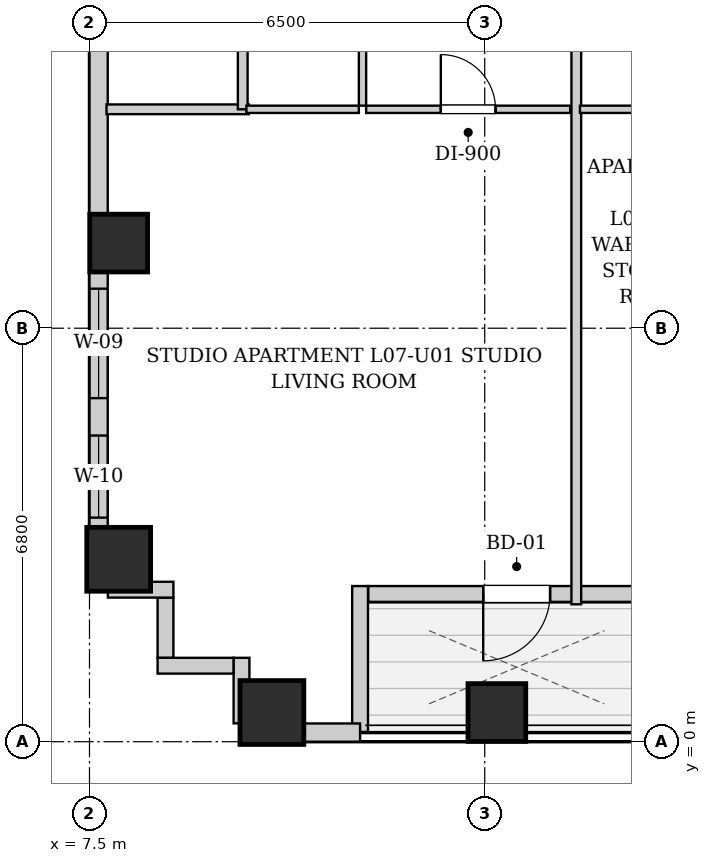
"""IFC4 building model, lengths in metres.
Left out: names, types, materials, properties, quantities, classifications, styles, units other than length and angle.
Written with IfcOpenShell. Run it as: python <this file> out.ifc"""

import sys

from ifc_helpers import new_model, si_unit, direction, frame, frame_2d, origin, origin_2d, place, context, subcontext, project, spatial, rectangle, extrude, element, fill, save


model = new_model("IFC4")
c1 = context("Model", 3, precision=1e-05, world=origin(), true_north=direction((0.0, 1.0)))
c2 = subcontext(c1, "Body", "Model", "MODEL_VIEW")
j1 = project(units=[si_unit("LENGTHUNIT", "METRE"), si_unit("PLANEANGLEUNIT", "RADIAN")], contexts=[c1])
p1 = place(None, origin())
s1 = spatial("IfcSite", under=j1, at=p1, CompositionType="ELEMENT")
p2 = place(p1, origin())
s2 = spatial("IfcBuilding", under=s1, at=p2, CompositionType="ELEMENT")
p3 = place(p2, frame((0.0, 0.0, 32.2)))
s3 = spatial("IfcBuildingStorey", under=s2, at=p3, CompositionType="ELEMENT", Elevation=32.2)
p4 = place(p3, frame((10.5, 0.48, 0.0), z_axis=(0.0, 0.0, 1.0), x_axis=(1.0, 0.0, 0.0)))
e1 = element("IfcColumn", 1, at=p4, inside=s3, PredefinedType="COLUMN", context=c2, shape_type="SweptSolid", body=[
    extrude(rectangle(XDim=1.05, YDim=1.05, at=origin_2d()), origin(), (0.0, 0.0, 1.0), 3.2),
])
p5 = place(p3, frame((14.2, 0.48, 0.0), z_axis=(0.0, 0.0, 1.0), x_axis=(1.0, 0.0, 0.0)))
e2 = element("IfcColumn", 2, at=p5, inside=s3, PredefinedType="COLUMN", context=c2, shape_type="SweptSolid", body=[
    extrude(rectangle(XDim=0.95, YDim=0.95, at=origin_2d()), origin(), (0.0, 0.0, 1.0), 3.2),
])
p6 = place(p3, frame((7.98, 3.0, 0.0), z_axis=(0.0, 0.0, 1.0), x_axis=(1.0, 0.0, 0.0)))
e3 = element("IfcColumn", 3, at=p6, inside=s3, PredefinedType="COLUMN", context=c2, shape_type="SweptSolid", body=[
    extrude(rectangle(XDim=1.05, YDim=1.05, at=origin_2d()), origin(), (0.0, 0.0, 1.0), 3.2),
])
p7 = place(p3, frame((7.98, 8.2, 0.0), z_axis=(0.0, 0.0, 1.0), x_axis=(1.0, 0.0, 0.0)))
e4 = element("IfcColumn", 4, at=p7, inside=s3, PredefinedType="COLUMN", context=c2, shape_type="SweptSolid", body=[
    extrude(rectangle(XDim=0.95, YDim=0.95, at=origin_2d()), origin(), (0.0, 0.0, 1.0), 3.2),
])
p8 = place(p3, frame((16.966, 2.43, 0.0), z_axis=(0.0, 0.0, 1.0), x_axis=(-1.0, 0.0, 0.0)))
e5 = element("IfcWall", 5, at=p8, inside=s3, PredefinedType="SOLIDWALL", context=c2, shape_type="SweptSolid", body=[
    extrude(rectangle(XDim=4.882, YDim=0.26, at=frame_2d((2.441, 0.0))), origin(), (0.0, 0.0, 1.0), 2.94),
])
p9 = place(p8, frame((1.891, 0.0, 0.0)))
e6 = element("IfcOpeningElement", 6, at=p9, cuts=e5, PredefinedType="OPENING", context=c2, shape_type="SweptSolid", body=[
    extrude(rectangle(XDim=1.1, YDim=2.0, at=frame_2d((0.55, 1.0))), frame((0.0, 0.14, 0.0), z_axis=(0.0, -1.0, 0.0), x_axis=(1.0, 0.0, 0.0)), (0.0, 0.0, 1.0), 0.28),
])
p10 = place(p3, frame((11.95, 2.56, 0.0), z_axis=(0.0, 0.0, 1.0), x_axis=(0.0, -1.0, 0.0)))
e7 = element("IfcWall", 7, at=p10, inside=s3, PredefinedType="SOLIDWALL", context=c2, shape_type="SweptSolid", body=[
    extrude(rectangle(XDim=2.4, YDim=0.26, at=frame_2d((1.2, 0.0))), origin(), (0.0, 0.0, 1.0), 2.94),
])
p11 = place(p3, frame((11.95, 0.15, 0.0), z_axis=(0.0, 0.0, 1.0), x_axis=(-1.0, 0.0, 0.0)))
e8 = element("IfcWall", 8, at=p11, inside=s3, PredefinedType="SOLIDWALL", context=c2, shape_type="SweptSolid", body=[
    extrude(rectangle(XDim=1.95, YDim=0.3, at=frame_2d((0.975, 0.0))), origin(), (0.0, 0.0, 1.0), 1.975),
])
p12 = place(p3, frame((7.65, 2.5, 0.0), z_axis=(0.0, 0.0, 1.0), x_axis=(0.0, 1.0, 0.0)))
e9 = element("IfcWall", 9, at=p12, inside=s3, PredefinedType="SOLIDWALL", context=c2, shape_type="SweptSolid", body=[
    extrude(rectangle(XDim=42.6, YDim=0.3, at=frame_2d((21.3, 0.0))), origin(), (0.0, 0.0, 1.0), 1.975),
])
p13 = place(p12, frame((3.15, 0.0, 0.55)))
e10 = element("IfcOpeningElement", 10, at=p13, cuts=e9, PredefinedType="OPENING", context=c2, shape_type="SweptSolid", body=[
    extrude(rectangle(XDim=1.8, YDim=1.2, at=frame_2d((0.9, 0.6))), frame((0.0, 0.16, 0.0), z_axis=(0.0, -1.0, 0.0), x_axis=(1.0, 0.0, 0.0)), (0.0, 0.0, 1.0), 0.32),
])
p14 = place(p12, frame((1.185, 0.0, 0.55)))
e11 = element("IfcOpeningElement", 11, at=p14, cuts=e9, PredefinedType="OPENING", context=c2, shape_type="SweptSolid", body=[
    extrude(rectangle(XDim=1.35, YDim=1.2, at=frame_2d((0.675, 0.6))), frame((0.0, 0.16, 0.0), z_axis=(0.0, -1.0, 0.0), x_axis=(1.0, 0.0, 0.0)), (0.0, 0.0, 1.0), 0.32),
])
p15 = place(p12, frame((37.135, 0.0, 0.55)))
e12 = element("IfcOpeningElement", 12, at=p15, cuts=e9, PredefinedType="OPENING", context=c2, shape_type="SweptSolid", body=[
    extrude(rectangle(XDim=1.8, YDim=1.2, at=frame_2d((0.9, 0.6))), frame((0.0, 0.16, 0.0), z_axis=(0.0, -1.0, 0.0), x_axis=(1.0, 0.0, 0.0)), (0.0, 0.0, 1.0), 0.32),
])
p16 = place(p12, frame((31.55, 0.0, 0.55)))
e13 = element("IfcOpeningElement", 13, at=p16, cuts=e9, PredefinedType="OPENING", context=c2, shape_type="SweptSolid", body=[
    extrude(rectangle(XDim=1.35, YDim=1.2, at=frame_2d((0.675, 0.6))), frame((0.0, 0.16, 0.0), z_axis=(0.0, -1.0, 0.0), x_axis=(1.0, 0.0, 0.0)), (0.0, 0.0, 1.0), 0.32),
])
p17 = place(p12, frame((15.2, 0.0, 0.55)))
e14 = element("IfcOpeningElement", 14, at=p17, cuts=e9, PredefinedType="OPENING", context=c2, shape_type="SweptSolid", body=[
    extrude(rectangle(XDim=1.8, YDim=1.2, at=frame_2d((0.9, 0.6))), frame((0.0, 0.16, 0.0), z_axis=(0.0, -1.0, 0.0), x_axis=(1.0, 0.0, 0.0)), (0.0, 0.0, 1.0), 0.32),
])
p18 = place(p12, frame((13.135, 0.0, 0.55)))
e15 = element("IfcOpeningElement", 15, at=p18, cuts=e9, PredefinedType="OPENING", context=c2, shape_type="SweptSolid", body=[
    extrude(rectangle(XDim=1.35, YDim=1.2, at=frame_2d((0.675, 0.6))), frame((0.0, 0.16, 0.0), z_axis=(0.0, -1.0, 0.0), x_axis=(1.0, 0.0, 0.0)), (0.0, 0.0, 1.0), 0.32),
])
p19 = place(p12, frame((22.575, 0.0, 0.55)))
e16 = element("IfcOpeningElement", 16, at=p19, cuts=e9, PredefinedType="OPENING", context=c2, shape_type="SweptSolid", body=[
    extrude(rectangle(XDim=1.8, YDim=1.2, at=frame_2d((0.9, 0.6))), frame((0.0, 0.16, 0.0), z_axis=(0.0, -1.0, 0.0), x_axis=(1.0, 0.0, 0.0)), (0.0, 0.0, 1.0), 0.32),
])
p20 = place(p3, frame((10.0, 0.302, 0.0), z_axis=(0.0, 0.0, 1.0), x_axis=(0.0, 1.0, 0.0)))
e17 = element("IfcWall", 17, at=p20, inside=s3, PredefinedType="SOLIDWALL", context=c2, shape_type="SweptSolid", body=[
    extrude(rectangle(XDim=1.078, YDim=0.26, at=frame_2d((0.539, 0.0))), origin(), (0.0, 0.0, 1.0), 2.94),
])
p21 = place(p3, frame((9.868, 1.25, 0.0), z_axis=(0.0, 0.0, 1.0), x_axis=(-1.0, 0.0, 0.0)))
e18 = element("IfcWall", 18, at=p21, inside=s3, PredefinedType="SOLIDWALL", context=c2, shape_type="SweptSolid", body=[
    extrude(rectangle(XDim=1.248, YDim=0.26, at=frame_2d((0.624, 0.0))), origin(), (0.0, 0.0, 1.0), 2.94),
])
p22 = place(p3, frame((8.75, 1.382, 0.0), z_axis=(0.0, 0.0, 1.0), x_axis=(0.0, 1.0, 0.0)))
e19 = element("IfcWall", 19, at=p22, inside=s3, PredefinedType="SOLIDWALL", context=c2, shape_type="SweptSolid", body=[
    extrude(rectangle(XDim=0.986, YDim=0.26, at=frame_2d((0.493, 0.0))), origin(), (0.0, 0.0, 1.0), 2.94),
])
p23 = place(p3, frame((8.88, 2.5, 0.0), z_axis=(0.0, 0.0, 1.0), x_axis=(-1.0, 0.0, 0.0)))
e20 = element("IfcWall", 20, at=p23, inside=s3, PredefinedType="SOLIDWALL", context=c2, shape_type="SweptSolid", body=[
    extrude(rectangle(XDim=1.078, YDim=0.26, at=frame_2d((0.539, 0.0))), origin(), (0.0, 0.0, 1.0), 2.94),
])
p24 = place(p3, frame((7.78, 10.4, 0.0), z_axis=(0.0, 0.0, 1.0), x_axis=(1.0, 0.0, 0.0)))
e21 = element("IfcWall", 21, at=p24, inside=s3, PredefinedType="PARTITIONING", context=c2, shape_type="SweptSolid", body=[
    extrude(rectangle(XDim=2.34, YDim=0.16, at=frame_2d((1.17, 0.0))), origin(), (0.0, 0.0, 1.0), 2.94),
])
p25 = place(p3, frame((10.02, 10.4, 0.0), z_axis=(0.0, 0.0, 1.0), x_axis=(0.0, 1.0, 0.0)))
e22 = element("IfcWall", 22, at=p25, inside=s3, PredefinedType="PARTITIONING", context=c2, shape_type="SweptSolid", body=[
    extrude(rectangle(XDim=2.91, YDim=0.16, at=frame_2d((1.455, 0.0))), origin(), (0.0, 0.0, 1.0), 2.94),
])
p26 = place(p3, frame((11.99, 10.46, 0.0), z_axis=(0.0, 0.0, 1.0), x_axis=(0.0, 1.0, 0.0)))
e23 = element("IfcWall", 23, at=p26, inside=s3, PredefinedType="PARTITIONING", context=c2, shape_type="SweptSolid", body=[
    extrude(rectangle(XDim=2.85, YDim=0.12, at=frame_2d((1.425, 0.0))), origin(), (0.0, 0.0, 1.0), 2.94),
])
p27 = place(p26, frame((0.995, 0.0, 0.0)))
e24 = element("IfcOpeningElement", 24, at=p27, cuts=e23, PredefinedType="OPENING", context=c2, shape_type="SweptSolid", body=[
    extrude(rectangle(XDim=0.86, YDim=2.05, at=frame_2d((0.43, 1.025))), frame((0.0, 0.07, 0.0), z_axis=(0.0, -1.0, 0.0), x_axis=(1.0, 0.0, 0.0)), (0.0, 0.0, 1.0), 0.14),
])
p28 = place(p3, frame((10.08, 10.4, 0.0), z_axis=(0.0, 0.0, 1.0), x_axis=(1.0, 0.0, 0.0)))
e25 = element("IfcWall", 25, at=p28, inside=s3, PredefinedType="PARTITIONING", context=c2, shape_type="SweptSolid", body=[
    extrude(rectangle(XDim=1.85, YDim=0.12, at=frame_2d((0.925, 0.0))), origin(), (0.0, 0.0, 1.0), 2.94),
])
p29 = place(p3, frame((12.05, 10.4, 0.0), z_axis=(0.0, 0.0, 1.0), x_axis=(1.0, 0.0, 0.0)))
e26 = element("IfcWall", 26, at=p29, inside=s3, PredefinedType="PARTITIONING", context=c2, shape_type="SweptSolid", body=[
    extrude(rectangle(XDim=3.356, YDim=0.12, at=frame_2d((1.678, 0.0))), origin(), (0.0, 0.0, 1.0), 2.94),
])
p30 = place(p29, frame((1.228, 0.0, 0.0)))
e27 = element("IfcOpeningElement", 27, at=p30, cuts=e26, PredefinedType="OPENING", context=c2, shape_type="SweptSolid", body=[
    extrude(rectangle(XDim=0.9, YDim=2.05, at=frame_2d((0.45, 1.025))), frame((0.0, 0.07, 0.0), z_axis=(0.0, -1.0, 0.0), x_axis=(1.0, 0.0, 0.0)), (0.0, 0.0, 1.0), 0.14),
])
p31 = place(p3, frame((15.506, 2.26, 0.0), z_axis=(0.0, 0.0, 1.0), x_axis=(0.0, 1.0, 0.0)))
e28 = element("IfcWall", 28, at=p31, inside=s3, PredefinedType="PARTITIONING", context=c2, shape_type="SweptSolid", body=[
    extrude(rectangle(XDim=11.05, YDim=0.16, at=frame_2d((5.525, 0.0))), origin(), (0.0, 0.0, 1.0), 2.94),
])
p32 = place(p3, frame((15.566, 10.4, 0.0), z_axis=(0.0, 0.0, 1.0), x_axis=(1.0, 0.0, 0.0)))
e29 = element("IfcWall", 29, at=p32, inside=s3, PredefinedType="PARTITIONING", context=c2, shape_type="SweptSolid", body=[
    extrude(rectangle(XDim=2.3, YDim=0.12, at=frame_2d((1.15, 0.0))), origin(), (0.0, 0.0, 1.0), 2.94),
])
p33 = place(p30, origin())
e30 = element("IfcDoor", 30, at=p33, inside=s3, OperationType="SINGLE_SWING_LEFT", PredefinedType="DOOR", context=c2, shape_type="SweptSolid", body=[
    extrude(rectangle(XDim=0.9, YDim=2.05, at=frame_2d((0.45, 1.025))), frame((0.0, 0.025, 0.0), z_axis=(0.0, -1.0, 0.0), x_axis=(1.0, 0.0, 0.0)), (0.0, 0.0, 1.0), 0.05),
])
fill(e27, e30)
p34 = place(p9, origin())
e31 = element("IfcDoor", 31, at=p34, inside=s3, OperationType="SINGLE_SWING_RIGHT", PredefinedType="DOOR", context=c2, shape_type="SweptSolid", body=[
    extrude(rectangle(XDim=1.1, YDim=2.0, at=frame_2d((0.55, 1.0))), frame((0.0, 0.025, 0.0), z_axis=(0.0, -1.0, 0.0), x_axis=(1.0, 0.0, 0.0)), (0.0, 0.0, 1.0), 0.05),
])
fill(e6, e31)
p35 = place(p13, origin())
e32 = element("IfcWindow", 32, at=p35, inside=s3, PartitioningType="DOUBLE_PANEL_VERTICAL", PredefinedType="WINDOW", context=c2, shape_type="SweptSolid", body=[
    extrude(rectangle(XDim=1.8, YDim=1.2, at=frame_2d((0.9, 0.6))), frame((0.0, 0.03, 0.0), z_axis=(0.0, -1.0, 0.0), x_axis=(1.0, 0.0, 0.0)), (0.0, 0.0, 1.0), 0.06),
])
fill(e10, e32)
p36 = place(p14, origin())
e33 = element("IfcWindow", 33, at=p36, inside=s3, PartitioningType="SINGLE_PANEL", PredefinedType="WINDOW", context=c2, shape_type="SweptSolid", body=[
    extrude(rectangle(XDim=1.35, YDim=1.2, at=frame_2d((0.675, 0.6))), frame((0.0, 0.03, 0.0), z_axis=(0.0, -1.0, 0.0), x_axis=(1.0, 0.0, 0.0)), (0.0, 0.0, 1.0), 0.06),
])
fill(e11, e33)
save(model, sys.argv[1])
